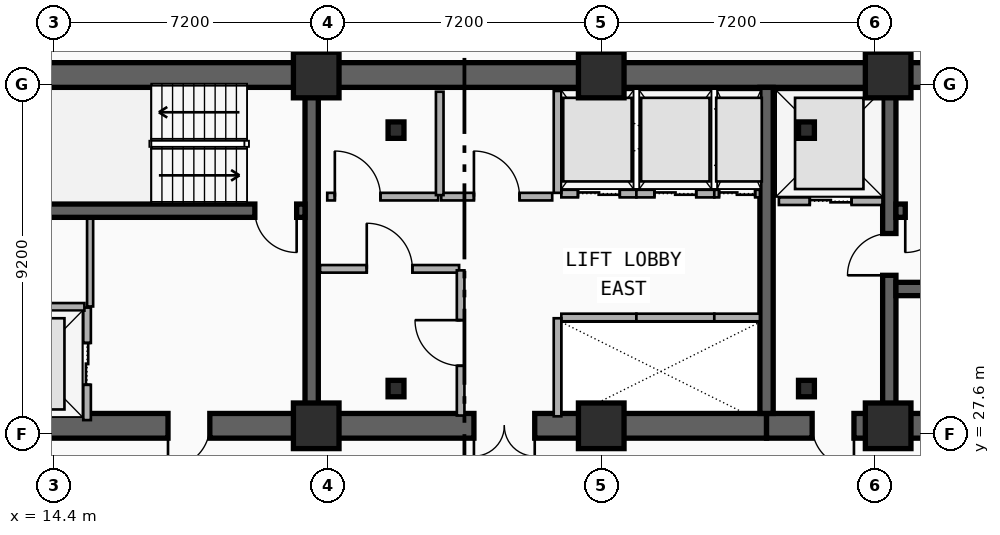
"""IFC4 building model, lengths in metres.
Left out: names, types, materials, properties, quantities, classifications, styles, units other than length and angle.
Written with IfcOpenShell. Run it as: python <this file> out.ifc"""

import sys

from ifc_helpers import new_model, si_unit, direction, frame, frame_2d, origin, origin_2d, place, context, subcontext, project, spatial, rectangle, i_section, extrude, element, fill, save


model = new_model("IFC4")
c1 = context("Model", 3, precision=1e-05, world=origin(), true_north=direction((0.0, 1.0)))
c2 = subcontext(c1, "Body", "Model", "MODEL_VIEW")
j1 = project(units=[si_unit("LENGTHUNIT", "METRE"), si_unit("PLANEANGLEUNIT", "RADIAN")], contexts=[c1])
p1 = place(None, origin())
s1 = spatial("IfcSite", under=j1, at=p1, CompositionType="ELEMENT")
p2 = place(p1, origin())
s2 = spatial("IfcBuilding", under=s1, at=p2, CompositionType="ELEMENT")
p3 = place(p2, frame((0.0, 0.0, 111.8)))
s3 = spatial("IfcBuildingStorey", under=s2, at=p3, CompositionType="ELEMENT", Elevation=111.8)
p4 = place(p3, frame((12.15, 37.05, 0.0), z_axis=(0.0, 0.0, 1.0), x_axis=(1.0, 0.0, 0.0)))
e1 = element("IfcWall", 1, at=p4, inside=s3, PredefinedType="SHEAR", context=c2, shape_type="SweptSolid", body=[
    extrude(rectangle(XDim=33.23, YDim=0.65, at=frame_2d((16.615, 0.0))), origin(), (0.0, 0.0, 1.0), 3.5),
])
p5 = place(p3, frame((21.18, 27.82, 0.0), z_axis=(0.0, 0.0, 1.0), x_axis=(-1.0, 0.0, 0.0)))
e2 = element("IfcWall", 2, at=p5, inside=s3, PredefinedType="SHEAR", context=c2, shape_type="SweptSolid", body=[
    extrude(rectangle(XDim=9.03, YDim=0.65, at=frame_2d((4.515, 0.0))), origin(), (0.0, 0.0, 1.0), 3.5),
])
p6 = place(p5, frame((2.68, 0.0, 0.0)))
e3 = element("IfcOpeningElement", 3, at=p6, cuts=e2, PredefinedType="OPENING", context=c2, shape_type="SweptSolid", body=[
    extrude(rectangle(XDim=1.1, YDim=2.15, at=frame_2d((0.55, 1.075))), frame((0.0, 0.335, 0.0), z_axis=(0.0, -1.0, 0.0), x_axis=(1.0, 0.0, 0.0)), (0.0, 0.0, 1.0), 0.67),
])
p7 = place(p3, frame((33.15, 27.82, 0.0), z_axis=(0.0, 0.0, 1.0), x_axis=(-1.0, 0.0, 0.0)))
e4 = element("IfcWall", 4, at=p7, inside=s3, PredefinedType="SHEAR", context=c2, shape_type="SweptSolid", body=[
    extrude(rectangle(XDim=11.97, YDim=0.65, at=frame_2d((5.985, 0.0))), origin(), (0.0, 0.0, 1.0), 3.5),
])
p8 = place(p7, frame((6.1, 0.0, 0.0)))
e5 = element("IfcOpeningElement", 5, at=p8, cuts=e4, PredefinedType="OPENING", context=c2, shape_type="SweptSolid", body=[
    extrude(rectangle(XDim=1.6, YDim=2.2, at=frame_2d((0.8, 1.1))), frame((0.0, 0.335, 0.0), z_axis=(0.0, -1.0, 0.0), x_axis=(1.0, 0.0, 0.0)), (0.0, 0.0, 1.0), 0.67),
])
p9 = place(p3, frame((45.38, 27.82, 0.0), z_axis=(0.0, 0.0, 1.0), x_axis=(-1.0, 0.0, 0.0)))
e6 = element("IfcWall", 6, at=p9, inside=s3, PredefinedType="SHEAR", context=c2, shape_type="SweptSolid", body=[
    extrude(rectangle(XDim=12.23, YDim=0.65, at=frame_2d((6.115, 0.0))), origin(), (0.0, 0.0, 1.0), 3.5),
])
p10 = place(p9, frame((9.93, 0.0, 0.0)))
e7 = element("IfcOpeningElement", 7, at=p10, cuts=e6, PredefinedType="OPENING", context=c2, shape_type="SweptSolid", body=[
    extrude(rectangle(XDim=1.1, YDim=2.15, at=frame_2d((0.55, 1.075))), frame((0.0, 0.335, 0.0), z_axis=(0.0, -1.0, 0.0), x_axis=(1.0, 0.0, 0.0)), (0.0, 0.0, 1.0), 0.67),
])
p11 = place(p9, frame((6.23, 0.0, 0.0)))
e8 = element("IfcOpeningElement", 8, at=p11, cuts=e6, PredefinedType="OPENING", context=c2, shape_type="SweptSolid", body=[
    extrude(rectangle(XDim=1.1, YDim=2.15, at=frame_2d((0.55, 1.075))), frame((0.0, 0.335, 0.0), z_axis=(0.0, -1.0, 0.0), x_axis=(1.0, 0.0, 0.0)), (0.0, 0.0, 1.0), 0.67),
])
for number, where, z_axis, x_axis in (
    (9, (21.18, 28.145, 0.0), (0.0, 0.0, 1.0), (0.0, 1.0, 0.0)),
    (10, (33.15, 28.145, 0.0), (0.0, 0.0, 1.0), (0.0, 1.0, 0.0)),
):
    element("IfcWall", number, at=place(p3, frame(where, z_axis=z_axis, x_axis=x_axis)), inside=s3, PredefinedType="SHEAR", context=c2, shape_type="SweptSolid", body=[
        extrude(rectangle(XDim=8.58, YDim=0.35, at=frame_2d((4.29, 0.0))), origin(), (0.0, 0.0, 1.0), 3.5),
    ])
p12 = place(p3, frame((36.38, 28.145, 0.0), z_axis=(0.0, 0.0, 1.0), x_axis=(0.0, 1.0, 0.0)))
e11 = element("IfcWall", 11, at=p12, inside=s3, PredefinedType="SHEAR", context=c2, shape_type="SweptSolid", body=[
    extrude(rectangle(XDim=8.58, YDim=0.35, at=frame_2d((4.29, 0.0))), origin(), (0.0, 0.0, 1.0), 3.5),
])
p13 = place(p12, frame((3.635, 0.0, 0.0)))
e12 = element("IfcOpeningElement", 12, at=p13, cuts=e11, PredefinedType="OPENING", context=c2, shape_type="SweptSolid", body=[
    extrude(rectangle(XDim=1.1, YDim=2.15, at=frame_2d((0.55, 1.075))), frame((0.0, 0.185, 0.0), z_axis=(0.0, -1.0, 0.0), x_axis=(1.0, 0.0, 0.0)), (0.0, 0.0, 1.0), 0.37),
])
p14 = place(p3, frame((21.005, 33.48, 0.0), z_axis=(0.0, 0.0, 1.0), x_axis=(-1.0, 0.0, 0.0)))
e13 = element("IfcWall", 13, at=p14, inside=s3, PredefinedType="SHEAR", context=c2, shape_type="SweptSolid", body=[
    extrude(rectangle(XDim=8.53, YDim=0.35, at=frame_2d((4.265, 0.0))), origin(), (0.0, 0.0, 1.0), 3.5),
])
p15 = place(p14, frame((0.22, 0.0, 0.0)))
e14 = element("IfcOpeningElement", 14, at=p15, cuts=e13, PredefinedType="OPENING", context=c2, shape_type="SweptSolid", body=[
    extrude(rectangle(XDim=1.1, YDim=2.15, at=frame_2d((0.55, 1.075))), frame((0.0, 0.185, 0.0), z_axis=(0.0, -1.0, 0.0), x_axis=(1.0, 0.0, 0.0)), (0.0, 0.0, 1.0), 0.37),
])
p16 = place(p3, frame((45.055, 33.48, 0.0), z_axis=(0.0, 0.0, 1.0), x_axis=(-1.0, 0.0, 0.0)))
e15 = element("IfcWall", 15, at=p16, inside=s3, PredefinedType="SHEAR", context=c2, shape_type="SweptSolid", body=[
    extrude(rectangle(XDim=8.5, YDim=0.35, at=frame_2d((4.25, 0.0))), origin(), (0.0, 0.0, 1.0), 3.5),
])
p17 = place(p16, frame((7.155, 0.0, 0.0)))
e16 = element("IfcOpeningElement", 16, at=p17, cuts=e15, PredefinedType="OPENING", context=c2, shape_type="SweptSolid", body=[
    extrude(rectangle(XDim=1.1, YDim=2.15, at=frame_2d((0.55, 1.075))), frame((0.0, 0.185, 0.0), z_axis=(0.0, -1.0, 0.0), x_axis=(1.0, 0.0, 0.0)), (0.0, 0.0, 1.0), 0.37),
])
p18 = place(p3, frame((36.555, 31.42, 0.0), z_axis=(0.0, 0.0, 1.0), x_axis=(1.0, 0.0, 0.0)))
e17 = element("IfcWall", 17, at=p18, inside=s3, PredefinedType="SHEAR", context=c2, shape_type="SweptSolid", body=[
    extrude(rectangle(XDim=8.5, YDim=0.35, at=frame_2d((4.25, 0.0))), origin(), (0.0, 0.0, 1.0), 3.5),
])
for number, where, z_axis, x_axis in (
    (18, (23.4, 28.8, 0.0), (0.0, 0.0, 1.0), (1.0, 0.0, 0.0)),
    (19, (34.2, 28.8, 0.0), (0.0, 0.0, 1.0), (1.0, 0.0, 0.0)),
    (20, (34.2, 35.6, 0.0), (0.0, 0.0, 1.0), (1.0, 0.0, 0.0)),
    (21, (23.4, 35.6, 0.0), (0.0, 0.0, 1.0), (1.0, 0.0, 0.0)),
):
    element("IfcColumn", number, at=place(p3, frame(where, z_axis=z_axis, x_axis=x_axis)), inside=s3, PredefinedType="COLUMN", context=c2, shape_type="SweptSolid", body=[
        extrude(i_section(OverallWidth=0.418, OverallDepth=0.432, WebThickness=0.035, FlangeThickness=0.056, FilletRadius=0.015, at=origin_2d()), origin(), (0.0, 0.0, 1.0), 3.5),
    ])
for number, where, z_axis, x_axis in (
    (22, (21.3, 27.82, 0.0), (0.0, 0.0, 1.0), (1.0, 0.0, 0.0)),
    (23, (21.3, 37.05, 0.0), (0.0, 0.0, 1.0), (1.0, 0.0, 0.0)),
    (24, (28.8, 27.82, 0.0), (0.0, 0.0, 1.0), (1.0, 0.0, 0.0)),
    (25, (28.8, 37.05, 0.0), (0.0, 0.0, 1.0), (1.0, 0.0, 0.0)),
    (26, (36.35, 27.82, 0.0), (0.0, 0.0, 1.0), (1.0, 0.0, 0.0)),
    (27, (36.35, 37.05, 0.0), (0.0, 0.0, 1.0), (1.0, 0.0, 0.0)),
):
    element("IfcColumn", number, at=place(p3, frame(where, z_axis=z_axis, x_axis=x_axis)), inside=s3, PredefinedType="COLUMN", context=c2, shape_type="SweptSolid", body=[
        extrude(rectangle(XDim=1.2, YDim=1.2, at=origin_2d()), origin(), (0.0, 0.0, 1.0), 3.5),
    ])
p19 = place(p3, frame((15.27, 27.97, 0.0), z_axis=(0.0, 0.0, 1.0), x_axis=(0.0, 1.0, 0.0)))
e28 = element("IfcWall", 28, at=p19, inside=s3, PredefinedType="PARTITIONING", context=c2, shape_type="SweptSolid", body=[
    extrude(rectangle(XDim=2.96, YDim=0.2, at=frame_2d((1.48, 0.0))), origin(), (0.0, 0.0, 1.0), 2.212),
])
p20 = place(p19, frame((0.93, 0.0, 0.0)))
e29 = element("IfcOpeningElement", 29, at=p20, cuts=e28, PredefinedType="OPENING", context=c2, shape_type="SweptSolid", body=[
    extrude(rectangle(XDim=1.1, YDim=2.15, at=frame_2d((0.55, 1.075))), frame((0.0, 0.11, 0.0), z_axis=(0.0, -1.0, 0.0), x_axis=(1.0, 0.0, 0.0)), (0.0, 0.0, 1.0), 0.22),
])
p21 = place(p3, frame((12.45, 30.95, 0.0), z_axis=(0.0, 0.0, 1.0), x_axis=(1.0, 0.0, 0.0)))
e30 = element("IfcWall", 30, at=p21, inside=s3, PredefinedType="PARTITIONING", context=c2, shape_type="SweptSolid", body=[
    extrude(rectangle(XDim=2.75, YDim=0.2, at=frame_2d((1.375, 0.0))), origin(), (0.0, 0.0, 1.0), 2.212),
])
p22 = place(p3, frame((33.475, 33.73, 0.0), z_axis=(0.0, 0.0, 1.0), x_axis=(1.0, 0.0, 0.0)))
e31 = element("IfcWall", 31, at=p22, inside=s3, PredefinedType="PARTITIONING", context=c2, shape_type="SweptSolid", body=[
    extrude(rectangle(XDim=2.725, YDim=0.2, at=frame_2d((1.362, 0.0))), origin(), (0.0, 0.0, 1.0), 2.212),
])
p23 = place(p22, frame((0.812, 0.0, 0.0)))
e32 = element("IfcOpeningElement", 32, at=p23, cuts=e31, PredefinedType="OPENING", context=c2, shape_type="SweptSolid", body=[
    extrude(rectangle(XDim=1.1, YDim=2.15, at=frame_2d((0.55, 1.075))), frame((0.0, 0.11, 0.0), z_axis=(0.0, -1.0, 0.0), x_axis=(1.0, 0.0, 0.0)), (0.0, 0.0, 1.0), 0.22),
])
p24 = place(p3, frame((27.75, 30.67, 0.0), z_axis=(0.0, 0.0, 1.0), x_axis=(1.0, 0.0, 0.0)))
e33 = element("IfcWall", 33, at=p24, inside=s3, PredefinedType="PARTITIONING", context=c2, shape_type="SweptSolid", body=[
    extrude(rectangle(XDim=1.975, YDim=0.2, at=frame_2d((0.988, 0.0))), origin(), (0.0, 0.0, 1.0), 2.212),
])
p25 = place(p3, frame((27.65, 28.07, 0.0), z_axis=(0.0, 0.0, 1.0), x_axis=(0.0, 1.0, 0.0)))
e34 = element("IfcWall", 34, at=p25, inside=s3, PredefinedType="PARTITIONING", context=c2, shape_type="SweptSolid", body=[
    extrude(rectangle(XDim=2.58, YDim=0.2, at=frame_2d((1.29, 0.0))), origin(), (0.0, 0.0, 1.0), 2.212),
])
p26 = place(p3, frame((29.725, 30.67, 0.0), z_axis=(0.0, 0.0, 1.0), x_axis=(1.0, 0.0, 0.0)))
e35 = element("IfcWall", 35, at=p26, inside=s3, PredefinedType="PARTITIONING", context=c2, shape_type="SweptSolid", body=[
    extrude(rectangle(XDim=2.05, YDim=0.2, at=frame_2d((1.025, 0.0))), origin(), (0.0, 0.0, 1.0), 2.62),
])
p27 = place(p3, frame((31.775, 30.67, 0.0), z_axis=(0.0, 0.0, 1.0), x_axis=(1.0, 0.0, 0.0)))
e36 = element("IfcWall", 36, at=p27, inside=s3, PredefinedType="PARTITIONING", context=c2, shape_type="SweptSolid", body=[
    extrude(rectangle(XDim=1.2, YDim=0.2, at=frame_2d((0.6, 0.0))), origin(), (0.0, 0.0, 1.0), 2.62),
])
p28 = place(p3, frame((27.75, 33.93, 0.0), z_axis=(0.0, 0.0, 1.0), x_axis=(1.0, 0.0, 0.0)))
e37 = element("IfcWall", 37, at=p28, inside=s3, PredefinedType="PARTITIONING", context=c2, shape_type="SweptSolid", body=[
    extrude(rectangle(XDim=1.975, YDim=0.2, at=frame_2d((0.988, 0.0))), origin(), (0.0, 0.0, 1.0), 2.212),
])
p29 = place(p28, frame((0.438, 0.0, 0.0)))
e38 = element("IfcOpeningElement", 38, at=p29, cuts=e37, PredefinedType="OPENING", context=c2, shape_type="SweptSolid", body=[
    extrude(rectangle(XDim=1.1, YDim=2.15, at=frame_2d((0.55, 1.075))), frame((0.0, 0.11, 0.0), z_axis=(0.0, -1.0, 0.0), x_axis=(1.0, 0.0, 0.0)), (0.0, 0.0, 1.0), 0.22),
])
p30 = place(p3, frame((27.65, 33.95, 0.0), z_axis=(0.0, 0.0, 1.0), x_axis=(0.0, 1.0, 0.0)))
e39 = element("IfcWall", 39, at=p30, inside=s3, PredefinedType="PARTITIONING", context=c2, shape_type="SweptSolid", body=[
    extrude(rectangle(XDim=2.68, YDim=0.2, at=frame_2d((1.34, 0.0))), origin(), (0.0, 0.0, 1.0), 2.212),
])
p31 = place(p3, frame((29.725, 33.93, 0.0), z_axis=(0.0, 0.0, 1.0), x_axis=(1.0, 0.0, 0.0)))
e40 = element("IfcWall", 40, at=p31, inside=s3, PredefinedType="PARTITIONING", context=c2, shape_type="SweptSolid", body=[
    extrude(rectangle(XDim=2.05, YDim=0.2, at=frame_2d((1.025, 0.0))), origin(), (0.0, 0.0, 1.0), 3.24),
])
p32 = place(p31, frame((0.475, 0.0, 0.0)))
e41 = element("IfcOpeningElement", 41, at=p32, cuts=e40, PredefinedType="OPENING", context=c2, shape_type="SweptSolid", body=[
    extrude(rectangle(XDim=1.1, YDim=2.15, at=frame_2d((0.55, 1.075))), frame((0.0, 0.11, 0.0), z_axis=(0.0, -1.0, 0.0), x_axis=(1.0, 0.0, 0.0)), (0.0, 0.0, 1.0), 0.22),
])
p33 = place(p3, frame((31.775, 33.93, 0.0), z_axis=(0.0, 0.0, 1.0), x_axis=(1.0, 0.0, 0.0)))
e42 = element("IfcWall", 42, at=p33, inside=s3, PredefinedType="PARTITIONING", context=c2, shape_type="SweptSolid", body=[
    extrude(rectangle(XDim=1.2, YDim=0.2, at=frame_2d((0.6, 0.0))), origin(), (0.0, 0.0, 1.0), 3.24),
])
p34 = place(p33, frame((0.125, 0.0, 0.0)))
e43 = element("IfcOpeningElement", 43, at=p34, cuts=e42, PredefinedType="OPENING", context=c2, shape_type="SweptSolid", body=[
    extrude(rectangle(XDim=0.95, YDim=2.15, at=frame_2d((0.475, 1.075))), frame((0.0, 0.11, 0.0), z_axis=(0.0, -1.0, 0.0), x_axis=(1.0, 0.0, 0.0)), (0.0, 0.0, 1.0), 0.22),
])
p35 = place(p3, frame((21.4, 31.95, 0.0), z_axis=(0.0, 0.0, 1.0), x_axis=(1.0, 0.0, 0.0)))
e44 = element("IfcWall", 44, at=p35, inside=s3, PredefinedType="PARTITIONING", context=c2, shape_type="SweptSolid", body=[
    extrude(rectangle(XDim=3.66, YDim=0.2, at=frame_2d((1.83, 0.0))), origin(), (0.0, 0.0, 1.0), 2.28),
])
p36 = place(p35, frame((1.23, 0.0, 0.0)))
e45 = element("IfcOpeningElement", 45, at=p36, cuts=e44, PredefinedType="OPENING", context=c2, shape_type="SweptSolid", body=[
    extrude(rectangle(XDim=1.2, YDim=2.15, at=frame_2d((0.6, 1.075))), frame((0.0, 0.11, 0.0), z_axis=(0.0, -1.0, 0.0), x_axis=(1.0, 0.0, 0.0)), (0.0, 0.0, 1.0), 0.22),
])
p37 = place(p3, frame((21.59, 33.85, 0.0), z_axis=(0.0, 0.0, 1.0), x_axis=(1.0, 0.0, 0.0)))
e46 = element("IfcWall", 46, at=p37, inside=s3, PredefinedType="PARTITIONING", context=c2, shape_type="SweptSolid", body=[
    extrude(rectangle(XDim=2.92, YDim=0.2, at=frame_2d((1.46, 0.0))), origin(), (0.0, 0.0, 1.0), 2.28),
])
p38 = place(p37, frame((0.2, 0.0, 0.0)))
e47 = element("IfcOpeningElement", 47, at=p38, cuts=e46, PredefinedType="OPENING", context=c2, shape_type="SweptSolid", body=[
    extrude(rectangle(XDim=1.2, YDim=2.15, at=frame_2d((0.6, 1.075))), frame((0.0, 0.11, 0.0), z_axis=(0.0, -1.0, 0.0), x_axis=(1.0, 0.0, 0.0)), (0.0, 0.0, 1.0), 0.22),
])
p39 = place(p3, frame((24.59, 33.85, 0.0), z_axis=(0.0, 0.0, 1.0), x_axis=(1.0, 0.0, 0.0)))
e48 = element("IfcWall", 48, at=p39, inside=s3, PredefinedType="PARTITIONING", context=c2, shape_type="SweptSolid", body=[
    extrude(rectangle(XDim=2.92, YDim=0.2, at=frame_2d((1.46, 0.0))), origin(), (0.0, 0.0, 1.0), 3.24),
])
p40 = place(p39, frame((0.86, 0.0, 0.0)))
e49 = element("IfcOpeningElement", 49, at=p40, cuts=e48, PredefinedType="OPENING", context=c2, shape_type="SweptSolid", body=[
    extrude(rectangle(XDim=1.2, YDim=2.15, at=frame_2d((0.6, 1.075))), frame((0.0, 0.11, 0.0), z_axis=(0.0, -1.0, 0.0), x_axis=(1.0, 0.0, 0.0)), (0.0, 0.0, 1.0), 0.22),
])
p41 = place(p3, frame((25.1, 28.09, 0.0), z_axis=(0.0, 0.0, 1.0), x_axis=(0.0, 1.0, 0.0)))
e50 = element("IfcWall", 50, at=p41, inside=s3, PredefinedType="PARTITIONING", context=c2, shape_type="SweptSolid", body=[
    extrude(rectangle(XDim=3.82, YDim=0.2, at=frame_2d((1.91, 0.0))), origin(), (0.0, 0.0, 1.0), 2.62),
])
p42 = place(p41, frame((1.31, 0.0, 0.0)))
e51 = element("IfcOpeningElement", 51, at=p42, cuts=e50, PredefinedType="OPENING", context=c2, shape_type="SweptSolid", body=[
    extrude(rectangle(XDim=1.2, YDim=2.15, at=frame_2d((0.6, 1.075))), frame((0.0, 0.11, 0.0), z_axis=(0.0, -1.0, 0.0), x_axis=(1.0, 0.0, 0.0)), (0.0, 0.0, 1.0), 0.22),
])
p43 = place(p3, frame((24.55, 33.89, 0.0), z_axis=(0.0, 0.0, 1.0), x_axis=(0.0, 1.0, 0.0)))
e52 = element("IfcWall", 52, at=p43, inside=s3, PredefinedType="PARTITIONING", context=c2, shape_type="SweptSolid", body=[
    extrude(rectangle(XDim=2.72, YDim=0.2, at=frame_2d((1.36, 0.0))), origin(), (0.0, 0.0, 1.0), 3.24),
])
p44 = place(p3, frame((15.35, 30.96, 0.0), z_axis=(0.0, 0.0, 1.0), x_axis=(0.0, 1.0, 0.0)))
e53 = element("IfcWall", 53, at=p44, inside=s3, PredefinedType="PARTITIONING", context=c2, shape_type="SweptSolid", body=[
    extrude(rectangle(XDim=2.31, YDim=0.16, at=frame_2d((1.155, 0.0))), origin(), (0.0, 0.0, 1.0), 3.24),
])
p45 = place(p20, origin())
e54 = element("IfcDoor", 54, at=p45, inside=s3, OperationType="DOUBLE_DOOR_SLIDING", PredefinedType="DOOR", context=c2, shape_type="SweptSolid", body=[
    extrude(rectangle(XDim=1.1, YDim=2.15, at=frame_2d((0.55, 1.075))), frame((0.0, 0.025, 0.0), z_axis=(0.0, -1.0, 0.0), x_axis=(1.0, 0.0, 0.0)), (0.0, 0.0, 1.0), 0.05),
])
fill(e29, e54)
p46 = place(p23, origin())
e55 = element("IfcDoor", 55, at=p46, inside=s3, OperationType="DOUBLE_DOOR_SLIDING", PredefinedType="DOOR", context=c2, shape_type="SweptSolid", body=[
    extrude(rectangle(XDim=1.1, YDim=2.15, at=frame_2d((0.55, 1.075))), frame((0.0, 0.025, 0.0), z_axis=(0.0, -1.0, 0.0), x_axis=(1.0, 0.0, 0.0)), (0.0, 0.0, 1.0), 0.05),
])
fill(e32, e55)
p47 = place(p29, origin())
e56 = element("IfcDoor", 56, at=p47, inside=s3, OperationType="DOUBLE_DOOR_SLIDING", PredefinedType="DOOR", context=c2, shape_type="SweptSolid", body=[
    extrude(rectangle(XDim=1.1, YDim=2.15, at=frame_2d((0.55, 1.075))), frame((0.0, 0.025, 0.0), z_axis=(0.0, -1.0, 0.0), x_axis=(1.0, 0.0, 0.0)), (0.0, 0.0, 1.0), 0.05),
])
fill(e38, e56)
p48 = place(p32, origin())
e57 = element("IfcDoor", 57, at=p48, inside=s3, OperationType="DOUBLE_DOOR_SLIDING", PredefinedType="DOOR", context=c2, shape_type="SweptSolid", body=[
    extrude(rectangle(XDim=1.1, YDim=2.15, at=frame_2d((0.55, 1.075))), frame((0.0, 0.025, 0.0), z_axis=(0.0, -1.0, 0.0), x_axis=(1.0, 0.0, 0.0)), (0.0, 0.0, 1.0), 0.05),
])
fill(e41, e57)
p49 = place(p34, origin())
e58 = element("IfcDoor", 58, at=p49, inside=s3, OperationType="DOUBLE_DOOR_SLIDING", PredefinedType="DOOR", context=c2, shape_type="SweptSolid", body=[
    extrude(rectangle(XDim=0.95, YDim=2.15, at=frame_2d((0.475, 1.075))), frame((0.0, 0.025, 0.0), z_axis=(0.0, -1.0, 0.0), x_axis=(1.0, 0.0, 0.0)), (0.0, 0.0, 1.0), 0.05),
])
fill(e43, e58)
p50 = place(p15, origin())
e59 = element("IfcDoor", 59, at=p50, inside=s3, OperationType="SINGLE_SWING_LEFT", PredefinedType="DOOR", context=c2, shape_type="SweptSolid", body=[
    extrude(rectangle(XDim=1.1, YDim=2.15, at=frame_2d((0.55, 1.075))), frame((0.0, 0.025, 0.0), z_axis=(0.0, -1.0, 0.0), x_axis=(1.0, 0.0, 0.0)), (0.0, 0.0, 1.0), 0.05),
])
fill(e14, e59)
p51 = place(p6, origin())
e60 = element("IfcDoor", 60, at=p51, inside=s3, OperationType="SINGLE_SWING_RIGHT", PredefinedType="DOOR", context=c2, shape_type="SweptSolid", body=[
    extrude(rectangle(XDim=1.1, YDim=2.15, at=frame_2d((0.55, 1.075))), frame((0.0, 0.025, 0.0), z_axis=(0.0, -1.0, 0.0), x_axis=(1.0, 0.0, 0.0)), (0.0, 0.0, 1.0), 0.05),
])
fill(e3, e60)
p52 = place(p17, origin())
e61 = element("IfcDoor", 61, at=p52, inside=s3, OperationType="SINGLE_SWING_RIGHT", PredefinedType="DOOR", context=c2, shape_type="SweptSolid", body=[
    extrude(rectangle(XDim=1.1, YDim=2.15, at=frame_2d((0.55, 1.075))), frame((0.0, 0.025, 0.0), z_axis=(0.0, -1.0, 0.0), x_axis=(1.0, 0.0, 0.0)), (0.0, 0.0, 1.0), 0.05),
])
fill(e16, e61)
p53 = place(p13, origin())
e62 = element("IfcDoor", 62, at=p53, inside=s3, OperationType="SINGLE_SWING_LEFT", PredefinedType="DOOR", context=c2, shape_type="SweptSolid", body=[
    extrude(rectangle(XDim=1.1, YDim=2.15, at=frame_2d((0.55, 1.075))), frame((0.0, 0.025, 0.0), z_axis=(0.0, -1.0, 0.0), x_axis=(1.0, 0.0, 0.0)), (0.0, 0.0, 1.0), 0.05),
])
fill(e12, e62)
p54 = place(p10, origin())
e63 = element("IfcDoor", 63, at=p54, inside=s3, OperationType="SINGLE_SWING_LEFT", PredefinedType="DOOR", context=c2, shape_type="SweptSolid", body=[
    extrude(rectangle(XDim=1.1, YDim=2.15, at=frame_2d((0.55, 1.075))), frame((0.0, 0.025, 0.0), z_axis=(0.0, -1.0, 0.0), x_axis=(1.0, 0.0, 0.0)), (0.0, 0.0, 1.0), 0.05),
])
fill(e7, e63)
p55 = place(p8, origin())
e64 = element("IfcDoor", 64, at=p55, inside=s3, OperationType="SINGLE_SWING_LEFT", PredefinedType="DOOR", context=c2, shape_type="SweptSolid", body=[
    extrude(rectangle(XDim=1.6, YDim=2.2, at=frame_2d((0.8, 1.1))), frame((0.0, 0.025, 0.0), z_axis=(0.0, -1.0, 0.0), x_axis=(1.0, 0.0, 0.0)), (0.0, 0.0, 1.0), 0.05),
])
fill(e5, e64)
p56 = place(p36, origin())
e65 = element("IfcDoor", 65, at=p56, inside=s3, OperationType="SINGLE_SWING_LEFT", PredefinedType="DOOR", context=c2, shape_type="SweptSolid", body=[
    extrude(rectangle(XDim=1.2, YDim=2.15, at=frame_2d((0.6, 1.075))), frame((0.0, 0.025, 0.0), z_axis=(0.0, -1.0, 0.0), x_axis=(1.0, 0.0, 0.0)), (0.0, 0.0, 1.0), 0.05),
])
fill(e45, e65)
p57 = place(p38, origin())
e66 = element("IfcDoor", 66, at=p57, inside=s3, OperationType="SINGLE_SWING_LEFT", PredefinedType="DOOR", context=c2, shape_type="SweptSolid", body=[
    extrude(rectangle(XDim=1.2, YDim=2.15, at=frame_2d((0.6, 1.075))), frame((0.0, 0.025, 0.0), z_axis=(0.0, -1.0, 0.0), x_axis=(1.0, 0.0, 0.0)), (0.0, 0.0, 1.0), 0.05),
])
fill(e47, e66)
p58 = place(p40, origin())
e67 = element("IfcDoor", 67, at=p58, inside=s3, OperationType="SINGLE_SWING_LEFT", PredefinedType="DOOR", context=c2, shape_type="SweptSolid", body=[
    extrude(rectangle(XDim=1.2, YDim=2.15, at=frame_2d((0.6, 1.075))), frame((0.0, 0.025, 0.0), z_axis=(0.0, -1.0, 0.0), x_axis=(1.0, 0.0, 0.0)), (0.0, 0.0, 1.0), 0.05),
])
fill(e49, e67)
p59 = place(p42, origin())
e68 = element("IfcDoor", 68, at=p59, inside=s3, OperationType="SINGLE_SWING_RIGHT", PredefinedType="DOOR", context=c2, shape_type="SweptSolid", body=[
    extrude(rectangle(XDim=1.2, YDim=2.15, at=frame_2d((0.6, 1.075))), frame((0.0, 0.025, 0.0), z_axis=(0.0, -1.0, 0.0), x_axis=(1.0, 0.0, 0.0)), (0.0, 0.0, 1.0), 0.05),
])
fill(e51, e68)
save(model, sys.argv[1])
